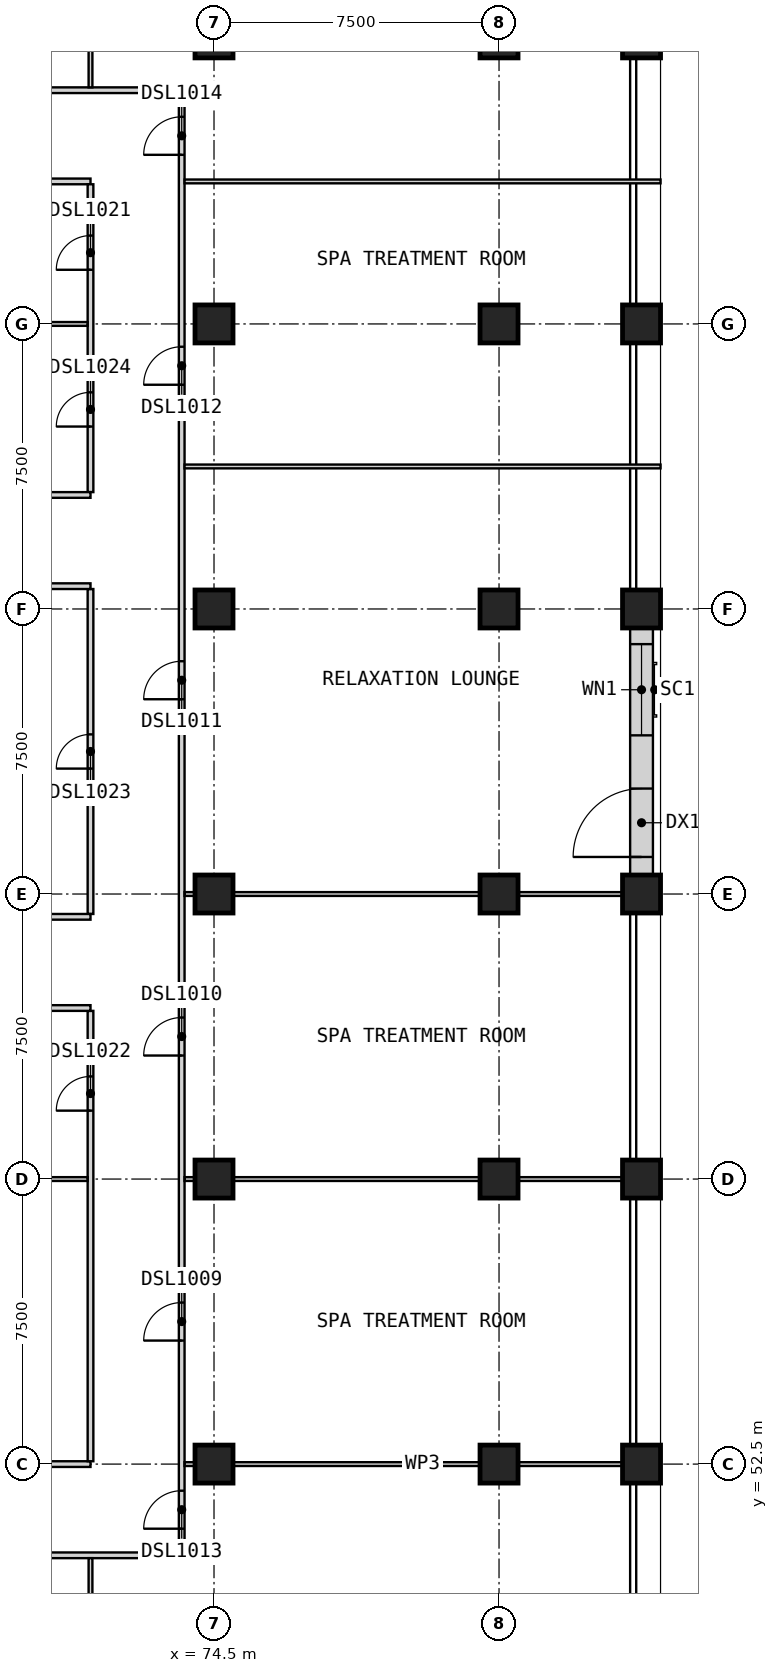
"""IFC4 building model, lengths in metres.
Left out: names, types, materials, properties, quantities, classifications, styles, units other than length and angle.
Written with IfcOpenShell. Run it as: python <this file> out.ifc"""

import sys

from ifc_helpers import new_model, si_unit, direction, frame, frame_2d, origin, origin_2d, place, context, subcontext, project, spatial, rectangle, extrude, element, fill, save


model = new_model("IFC4")
c1 = context("Model", 3, precision=1e-05, world=origin(), true_north=direction((0.0, 1.0)))
c2 = subcontext(c1, "Body", "Model", "MODEL_VIEW")
j1 = project(units=[si_unit("LENGTHUNIT", "METRE"), si_unit("PLANEANGLEUNIT", "RADIAN")], contexts=[c1])
p1 = place(None, origin())
s1 = spatial("IfcSite", under=j1, at=p1, CompositionType="ELEMENT")
p2 = place(p1, origin())
s2 = spatial("IfcBuilding", under=s1, at=p2, CompositionType="ELEMENT")
p3 = place(p2, frame((0.0, 0.0, 124.2)))
s3 = spatial("IfcBuildingStorey", under=s2, at=p3, CompositionType="ELEMENT", Elevation=124.2)
for number, where, z_axis, x_axis in (
    (1, (85.75, 52.5, 0.0), (0.0, 0.0, 1.0), (1.0, 0.0, 0.0)),
    (2, (85.75, 60.0, 0.0), (0.0, 0.0, 1.0), (1.0, 0.0, 0.0)),
    (3, (85.75, 67.5, 0.0), (0.0, 0.0, 1.0), (1.0, 0.0, 0.0)),
    (4, (85.75, 75.0, 0.0), (0.0, 0.0, 1.0), (1.0, 0.0, 0.0)),
    (5, (85.75, 82.5, 0.0), (0.0, 0.0, 1.0), (1.0, 0.0, 0.0)),
    (6, (85.75, 90.0, 0.0), (0.0, 0.0, 1.0), (1.0, 0.0, 0.0)),
    (7, (74.5, 52.5, 0.0), (0.0, 0.0, 1.0), (1.0, 0.0, 0.0)),
    (8, (74.5, 60.0, 0.0), (0.0, 0.0, 1.0), (1.0, 0.0, 0.0)),
    (9, (74.5, 67.5, 0.0), (0.0, 0.0, 1.0), (1.0, 0.0, 0.0)),
    (10, (74.5, 75.0, 0.0), (0.0, 0.0, 1.0), (1.0, 0.0, 0.0)),
    (11, (74.5, 82.5, 0.0), (0.0, 0.0, 1.0), (1.0, 0.0, 0.0)),
    (12, (74.5, 90.0, 0.0), (0.0, 0.0, 1.0), (1.0, 0.0, 0.0)),
    (13, (82.0, 52.5, 0.0), (0.0, 0.0, 1.0), (1.0, 0.0, 0.0)),
    (14, (82.0, 60.0, 0.0), (0.0, 0.0, 1.0), (1.0, 0.0, 0.0)),
    (15, (82.0, 67.5, 0.0), (0.0, 0.0, 1.0), (1.0, 0.0, 0.0)),
    (16, (82.0, 75.0, 0.0), (0.0, 0.0, 1.0), (1.0, 0.0, 0.0)),
    (17, (82.0, 82.5, 0.0), (0.0, 0.0, 1.0), (1.0, 0.0, 0.0)),
    (18, (82.0, 90.0, 0.0), (0.0, 0.0, 1.0), (1.0, 0.0, 0.0)),
):
    element("IfcColumn", number, at=place(p3, frame(where, z_axis=z_axis, x_axis=x_axis)), inside=s3, PredefinedType="COLUMN", context=c2, shape_type="SweptSolid", body=[
        extrude(rectangle(XDim=1.0, YDim=1.0, at=origin_2d()), origin(), (0.0, 0.0, 1.0), 6.0),
    ])
p4 = place(p3, frame((85.75, 68.0, 0.0), z_axis=(0.0, 0.0, 1.0), x_axis=(0.0, 1.0, 0.0)))
e19 = element("IfcWall", 19, at=p4, inside=s3, PredefinedType="SOLIDWALL", context=c2, shape_type="SweptSolid", body=[
    extrude(rectangle(XDim=6.5, YDim=0.6, at=frame_2d((3.25, 0.0))), origin(), (0.0, 0.0, 1.0), 5.25),
])
p5 = place(p4, frame((0.475, 0.0, 0.0)))
e20 = element("IfcOpeningElement", 20, at=p5, cuts=e19, PredefinedType="OPENING", context=c2, shape_type="SweptSolid", body=[
    extrude(rectangle(XDim=1.8, YDim=2.4, at=frame_2d((0.9, 1.2))), frame((0.0, 0.31, 0.0), z_axis=(0.0, -1.0, 0.0), x_axis=(1.0, 0.0, 0.0)), (0.0, 0.0, 1.0), 0.62),
])
p6 = place(p4, frame((3.675, 0.0, 0.8)))
e21 = element("IfcOpeningElement", 21, at=p6, cuts=e19, PredefinedType="OPENING", context=c2, shape_type="SweptSolid", body=[
    extrude(rectangle(XDim=2.4, YDim=1.8, at=frame_2d((1.2, 0.9))), frame((0.0, 0.31, 0.0), z_axis=(0.0, -1.0, 0.0), x_axis=(1.0, 0.0, 0.0)), (0.0, 0.0, 1.0), 0.62),
])
p7 = place(p3, frame((30.0, 50.1, 0.0), z_axis=(0.0, 0.0, 1.0), x_axis=(1.0, 0.0, 0.0)))
e22 = element("IfcWall", 22, at=p7, inside=s3, PredefinedType="PARTITIONING", context=c2, shape_type="SweptSolid", body=[
    extrude(rectangle(XDim=43.65, YDim=0.15, at=frame_2d((21.825, 0.0))), origin(), (0.0, 0.0, 1.0), 5.75),
])
p8 = place(p7, frame((5.125, 0.0, 0.0)))
e23 = element("IfcOpeningElement", 23, at=p8, cuts=e22, PredefinedType="OPENING", context=c2, shape_type="SweptSolid", body=[
    extrude(rectangle(XDim=1.0, YDim=2.1, at=frame_2d((0.5, 1.05))), frame((0.0, 0.085, 0.0), z_axis=(0.0, -1.0, 0.0), x_axis=(1.0, 0.0, 0.0)), (0.0, 0.0, 1.0), 0.17),
])
p9 = place(p7, frame((14.1, 0.0, 0.0)))
e24 = element("IfcOpeningElement", 24, at=p9, cuts=e22, PredefinedType="OPENING", context=c2, shape_type="SweptSolid", body=[
    extrude(rectangle(XDim=1.8, YDim=2.1, at=frame_2d((0.9, 1.05))), frame((0.0, 0.085, 0.0), z_axis=(0.0, -1.0, 0.0), x_axis=(1.0, 0.0, 0.0)), (0.0, 0.0, 1.0), 0.17),
])
p10 = place(p7, frame((27.225, 0.0, 0.0)))
e25 = element("IfcOpeningElement", 25, at=p10, cuts=e22, PredefinedType="OPENING", context=c2, shape_type="SweptSolid", body=[
    extrude(rectangle(XDim=1.8, YDim=2.1, at=frame_2d((0.9, 1.05))), frame((0.0, 0.085, 0.0), z_axis=(0.0, -1.0, 0.0), x_axis=(1.0, 0.0, 0.0)), (0.0, 0.0, 1.0), 0.17),
])
p11 = place(p7, frame((37.0, 0.0, 0.0)))
e26 = element("IfcOpeningElement", 26, at=p11, cuts=e22, PredefinedType="OPENING", context=c2, shape_type="SweptSolid", body=[
    extrude(rectangle(XDim=1.0, YDim=2.1, at=frame_2d((0.5, 1.05))), frame((0.0, 0.085, 0.0), z_axis=(0.0, -1.0, 0.0), x_axis=(1.0, 0.0, 0.0)), (0.0, 0.0, 1.0), 0.17),
])
p12 = place(p3, frame((60.0, 52.5, 0.0), z_axis=(0.0, 0.0, 1.0), x_axis=(1.0, 0.0, 0.0)))
e27 = element("IfcWall", 27, at=p12, inside=s3, PredefinedType="PARTITIONING", context=c2, shape_type="SweptSolid", body=[
    extrude(rectangle(XDim=11.25, YDim=0.15, at=frame_2d((5.625, 0.0))), origin(), (0.0, 0.0, 1.0), 5.75),
])
p13 = place(p12, frame((5.175, 0.0, 0.0)))
e28 = element("IfcOpeningElement", 28, at=p13, cuts=e27, PredefinedType="OPENING", context=c2, shape_type="SweptSolid", body=[
    extrude(rectangle(XDim=0.9, YDim=2.1, at=frame_2d((0.45, 1.05))), frame((0.0, 0.085, 0.0), z_axis=(0.0, -1.0, 0.0), x_axis=(1.0, 0.0, 0.0)), (0.0, 0.0, 1.0), 0.17),
])
p14 = place(p3, frame((33.75, 86.25, 0.0), z_axis=(0.0, 0.0, 1.0), x_axis=(1.0, 0.0, 0.0)))
e29 = element("IfcWall", 29, at=p14, inside=s3, PredefinedType="PARTITIONING", context=c2, shape_type="SweptSolid", body=[
    extrude(rectangle(XDim=37.5, YDim=0.15, at=frame_2d((18.75, 0.0))), origin(), (0.0, 0.0, 1.0), 5.75),
])
p15 = place(p14, frame((9.15, 0.0, 0.0)))
e30 = element("IfcOpeningElement", 30, at=p15, cuts=e29, PredefinedType="OPENING", context=c2, shape_type="SweptSolid", body=[
    extrude(rectangle(XDim=0.9, YDim=2.1, at=frame_2d((0.45, 1.05))), frame((0.0, 0.085, 0.0), z_axis=(0.0, -1.0, 0.0), x_axis=(1.0, 0.0, 0.0)), (0.0, 0.0, 1.0), 0.17),
])
p16 = place(p14, frame((24.0, 0.0, 0.0)))
e31 = element("IfcOpeningElement", 31, at=p16, cuts=e29, PredefinedType="OPENING", context=c2, shape_type="SweptSolid", body=[
    extrude(rectangle(XDim=0.9, YDim=2.1, at=frame_2d((0.45, 1.05))), frame((0.0, 0.085, 0.0), z_axis=(0.0, -1.0, 0.0), x_axis=(1.0, 0.0, 0.0)), (0.0, 0.0, 1.0), 0.17),
])
p17 = place(p3, frame((33.75, 88.65, 0.0), z_axis=(0.0, 0.0, 1.0), x_axis=(1.0, 0.0, 0.0)))
e32 = element("IfcWall", 32, at=p17, inside=s3, PredefinedType="PARTITIONING", context=c2, shape_type="SweptSolid", body=[
    extrude(rectangle(XDim=39.9, YDim=0.15, at=frame_2d((19.95, 0.0))), origin(), (0.0, 0.0, 1.0), 5.75),
])
p18 = place(p17, frame((4.725, 0.0, 0.0)))
e33 = element("IfcOpeningElement", 33, at=p18, cuts=e32, PredefinedType="OPENING", context=c2, shape_type="SweptSolid", body=[
    extrude(rectangle(XDim=1.8, YDim=2.1, at=frame_2d((0.9, 1.05))), frame((0.0, 0.085, 0.0), z_axis=(0.0, -1.0, 0.0), x_axis=(1.0, 0.0, 0.0)), (0.0, 0.0, 1.0), 0.17),
])
p19 = place(p17, frame((14.5, 0.0, 0.0)))
e34 = element("IfcOpeningElement", 34, at=p19, cuts=e32, PredefinedType="OPENING", context=c2, shape_type="SweptSolid", body=[
    extrude(rectangle(XDim=1.0, YDim=2.1, at=frame_2d((0.5, 1.05))), frame((0.0, 0.085, 0.0), z_axis=(0.0, -1.0, 0.0), x_axis=(1.0, 0.0, 0.0)), (0.0, 0.0, 1.0), 0.17),
])
p20 = place(p17, frame((22.0, 0.0, 0.0)))
e35 = element("IfcOpeningElement", 35, at=p20, cuts=e32, PredefinedType="OPENING", context=c2, shape_type="SweptSolid", body=[
    extrude(rectangle(XDim=1.0, YDim=2.1, at=frame_2d((0.5, 1.05))), frame((0.0, 0.085, 0.0), z_axis=(0.0, -1.0, 0.0), x_axis=(1.0, 0.0, 0.0)), (0.0, 0.0, 1.0), 0.17),
])
p21 = place(p17, frame((31.375, 0.0, 0.0)))
e36 = element("IfcOpeningElement", 36, at=p21, cuts=e32, PredefinedType="OPENING", context=c2, shape_type="SweptSolid", body=[
    extrude(rectangle(XDim=1.0, YDim=2.1, at=frame_2d((0.5, 1.05))), frame((0.0, 0.085, 0.0), z_axis=(0.0, -1.0, 0.0), x_axis=(1.0, 0.0, 0.0)), (0.0, 0.0, 1.0), 0.17),
])
p22 = place(p3, frame((71.25, 52.575, 0.0), z_axis=(0.0, 0.0, 1.0), x_axis=(0.0, 1.0, 0.0)))
e37 = element("IfcWall", 37, at=p22, inside=s3, PredefinedType="PARTITIONING", context=c2, shape_type="SweptSolid", body=[
    extrude(rectangle(XDim=11.85, YDim=0.15, at=frame_2d((5.925, 0.0))), origin(), (0.0, 0.0, 1.0), 5.75),
])
p23 = place(p22, frame((9.225, 0.0, 0.0)))
e38 = element("IfcOpeningElement", 38, at=p23, cuts=e37, PredefinedType="OPENING", context=c2, shape_type="SweptSolid", body=[
    extrude(rectangle(XDim=0.9, YDim=2.1, at=frame_2d((0.45, 1.05))), frame((0.0, 0.085, 0.0), z_axis=(0.0, -1.0, 0.0), x_axis=(1.0, 0.0, 0.0)), (0.0, 0.0, 1.0), 0.17),
])
p24 = place(p3, frame((71.25, 66.975, 0.0), z_axis=(0.0, 0.0, 1.0), x_axis=(0.0, 1.0, 0.0)))
e39 = element("IfcWall", 39, at=p24, inside=s3, PredefinedType="PARTITIONING", context=c2, shape_type="SweptSolid", body=[
    extrude(rectangle(XDim=8.55, YDim=0.15, at=frame_2d((4.275, 0.0))), origin(), (0.0, 0.0, 1.0), 5.75),
])
p25 = place(p24, frame((3.825, 0.0, 0.0)))
e40 = element("IfcOpeningElement", 40, at=p25, cuts=e39, PredefinedType="OPENING", context=c2, shape_type="SweptSolid", body=[
    extrude(rectangle(XDim=0.9, YDim=2.1, at=frame_2d((0.45, 1.05))), frame((0.0, 0.085, 0.0), z_axis=(0.0, -1.0, 0.0), x_axis=(1.0, 0.0, 0.0)), (0.0, 0.0, 1.0), 0.17),
])
p26 = place(p3, frame((71.25, 78.075, 0.0), z_axis=(0.0, 0.0, 1.0), x_axis=(0.0, 1.0, 0.0)))
e41 = element("IfcWall", 41, at=p26, inside=s3, PredefinedType="PARTITIONING", context=c2, shape_type="SweptSolid", body=[
    extrude(rectangle(XDim=8.1, YDim=0.15, at=frame_2d((4.05, 0.0))), origin(), (0.0, 0.0, 1.0), 5.75),
])
p27 = place(p26, frame((5.85, 0.0, 0.0)))
e42 = element("IfcOpeningElement", 42, at=p27, cuts=e41, PredefinedType="OPENING", context=c2, shape_type="SweptSolid", body=[
    extrude(rectangle(XDim=0.9, YDim=2.1, at=frame_2d((0.45, 1.05))), frame((0.0, 0.085, 0.0), z_axis=(0.0, -1.0, 0.0), x_axis=(1.0, 0.0, 0.0)), (0.0, 0.0, 1.0), 0.17),
])
p28 = place(p26, frame((1.725, 0.0, 0.0)))
e43 = element("IfcOpeningElement", 43, at=p28, cuts=e41, PredefinedType="OPENING", context=c2, shape_type="SweptSolid", body=[
    extrude(rectangle(XDim=0.9, YDim=2.1, at=frame_2d((0.45, 1.05))), frame((0.0, 0.085, 0.0), z_axis=(0.0, -1.0, 0.0), x_axis=(1.0, 0.0, 0.0)), (0.0, 0.0, 1.0), 0.17),
])
p29 = place(p3, frame((73.65, 50.175, 0.0), z_axis=(0.0, 0.0, 1.0), x_axis=(0.0, 1.0, 0.0)))
e44 = element("IfcWall", 44, at=p29, inside=s3, PredefinedType="PARTITIONING", context=c2, shape_type="SweptSolid", body=[
    extrude(rectangle(XDim=38.4, YDim=0.15, at=frame_2d((19.2, 0.0))), origin(), (0.0, 0.0, 1.0), 5.75),
])
p30 = place(p29, frame((5.575, 0.0, 0.0)))
e45 = element("IfcOpeningElement", 45, at=p30, cuts=e44, PredefinedType="OPENING", context=c2, shape_type="SweptSolid", body=[
    extrude(rectangle(XDim=1.0, YDim=2.1, at=frame_2d((0.5, 1.05))), frame((0.0, 0.085, 0.0), z_axis=(0.0, -1.0, 0.0), x_axis=(1.0, 0.0, 0.0)), (0.0, 0.0, 1.0), 0.17),
])
p31 = place(p29, frame((13.075, 0.0, 0.0)))
e46 = element("IfcOpeningElement", 46, at=p31, cuts=e44, PredefinedType="OPENING", context=c2, shape_type="SweptSolid", body=[
    extrude(rectangle(XDim=1.0, YDim=2.1, at=frame_2d((0.5, 1.05))), frame((0.0, 0.085, 0.0), z_axis=(0.0, -1.0, 0.0), x_axis=(1.0, 0.0, 0.0)), (0.0, 0.0, 1.0), 0.17),
])
p32 = place(p29, frame((22.45, 0.0, 0.0)))
e47 = element("IfcOpeningElement", 47, at=p32, cuts=e44, PredefinedType="OPENING", context=c2, shape_type="SweptSolid", body=[
    extrude(rectangle(XDim=1.0, YDim=2.1, at=frame_2d((0.5, 1.05))), frame((0.0, 0.085, 0.0), z_axis=(0.0, -1.0, 0.0), x_axis=(1.0, 0.0, 0.0)), (0.0, 0.0, 1.0), 0.17),
])
p33 = place(p29, frame((30.725, 0.0, 0.0)))
e48 = element("IfcOpeningElement", 48, at=p33, cuts=e44, PredefinedType="OPENING", context=c2, shape_type="SweptSolid", body=[
    extrude(rectangle(XDim=1.0, YDim=2.1, at=frame_2d((0.5, 1.05))), frame((0.0, 0.085, 0.0), z_axis=(0.0, -1.0, 0.0), x_axis=(1.0, 0.0, 0.0)), (0.0, 0.0, 1.0), 0.17),
])
p34 = place(p29, frame((0.625, 0.0, 0.0)))
e49 = element("IfcOpeningElement", 49, at=p34, cuts=e44, PredefinedType="OPENING", context=c2, shape_type="SweptSolid", body=[
    extrude(rectangle(XDim=1.0, YDim=2.1, at=frame_2d((0.5, 1.05))), frame((0.0, 0.085, 0.0), z_axis=(0.0, -1.0, 0.0), x_axis=(1.0, 0.0, 0.0)), (0.0, 0.0, 1.0), 0.17),
])
p35 = place(p29, frame((36.775, 0.0, 0.0)))
e50 = element("IfcOpeningElement", 50, at=p35, cuts=e44, PredefinedType="OPENING", context=c2, shape_type="SweptSolid", body=[
    extrude(rectangle(XDim=1.0, YDim=2.1, at=frame_2d((0.5, 1.05))), frame((0.0, 0.085, 0.0), z_axis=(0.0, -1.0, 0.0), x_axis=(1.0, 0.0, 0.0)), (0.0, 0.0, 1.0), 0.17),
])
p36 = place(p3, frame((73.725, 52.5, 0.0), z_axis=(0.0, 0.0, 1.0), x_axis=(1.0, 0.0, 0.0)))
e51 = element("IfcWall", 51, at=p36, inside=s3, PredefinedType="PARTITIONING", context=c2, shape_type="SweptSolid", body=[
    extrude(rectangle(XDim=12.525, YDim=0.1, at=frame_2d((6.262, 0.0))), origin(), (0.0, 0.0, 1.0), 5.75),
])
p37 = place(p3, frame((60.075, 60.0, 0.0), z_axis=(0.0, 0.0, 1.0), x_axis=(1.0, 0.0, 0.0)))
e52 = element("IfcWall", 52, at=p37, inside=s3, PredefinedType="PARTITIONING", context=c2, shape_type="SweptSolid", body=[
    extrude(rectangle(XDim=11.1, YDim=0.1, at=frame_2d((5.55, 0.0))), origin(), (0.0, 0.0, 1.0), 5.75),
])
for number, where, z_axis, x_axis in (
    (53, (73.725, 60.0, 0.0), (0.0, 0.0, 1.0), (1.0, 0.0, 0.0)),
    (54, (73.725, 67.5, 0.0), (0.0, 0.0, 1.0), (1.0, 0.0, 0.0)),
    (55, (73.725, 78.75, 0.0), (0.0, 0.0, 1.0), (1.0, 0.0, 0.0)),
):
    element("IfcWall", number, at=place(p3, frame(where, z_axis=z_axis, x_axis=x_axis)), inside=s3, PredefinedType="PARTITIONING", context=c2, shape_type="SweptSolid", body=[
        extrude(rectangle(XDim=12.525, YDim=0.1, at=frame_2d((6.262, 0.0))), origin(), (0.0, 0.0, 1.0), 5.75),
    ])
p38 = place(p3, frame((60.0, 82.5, 0.0), z_axis=(0.0, 0.0, 1.0), x_axis=(1.0, 0.0, 0.0)))
e56 = element("IfcWall", 56, at=p38, inside=s3, PredefinedType="PARTITIONING", context=c2, shape_type="SweptSolid", body=[
    extrude(rectangle(XDim=11.175, YDim=0.1, at=frame_2d((5.587, 0.0))), origin(), (0.0, 0.0, 1.0), 5.75),
])
for number, where, z_axis, x_axis in (
    (57, (73.725, 86.25, 0.0), (0.0, 0.0, 1.0), (1.0, 0.0, 0.0)),
    (58, (71.25, 37.5, 0.0), (0.0, 0.0, 1.0), (0.0, 1.0, 0.0)),
    (59, (71.25, 88.725, 0.0), (0.0, 0.0, 1.0), (0.0, 1.0, 0.0)),
):
    element("IfcWall", number, at=place(p3, frame(where, z_axis=z_axis, x_axis=x_axis)), inside=s3, PredefinedType="PARTITIONING", context=c2, shape_type="SweptSolid", body=[
        extrude(rectangle(XDim=12.525, YDim=0.1, at=frame_2d((6.262, 0.0))), origin(), (0.0, 0.0, 1.0), 5.75),
    ])
for number, where, z_axis, x_axis in (
    (60, (60.0, 64.5, 0.0), (0.0, 0.0, 1.0), (1.0, 0.0, 0.0)),
    (61, (60.0, 66.9, 0.0), (0.0, 0.0, 1.0), (1.0, 0.0, 0.0)),
    (62, (60.0, 75.6, 0.0), (0.0, 0.0, 1.0), (1.0, 0.0, 0.0)),
    (63, (60.0, 78.0, 0.0), (0.0, 0.0, 1.0), (1.0, 0.0, 0.0)),
):
    element("IfcWall", number, at=place(p3, frame(where, z_axis=z_axis, x_axis=x_axis)), inside=s3, PredefinedType="PARTITIONING", context=c2, shape_type="SweptSolid", body=[
        extrude(rectangle(XDim=11.25, YDim=0.15, at=frame_2d((5.625, 0.0))), origin(), (0.0, 0.0, 1.0), 5.75),
    ])
p39 = place(p5, origin())
e64 = element("IfcDoor", 64, at=p39, inside=s3, OperationType="SINGLE_SWING_LEFT", PredefinedType="DOOR", context=c2, shape_type="SweptSolid", body=[
    extrude(rectangle(XDim=1.8, YDim=2.4, at=frame_2d((0.9, 1.2))), frame((0.0, -0.075, 0.0), z_axis=(0.0, -1.0, 0.0), x_axis=(1.0, 0.0, 0.0)), (0.0, 0.0, 1.0), 0.05),
])
fill(e20, e64)
p40 = place(p6, origin())
e65 = element("IfcWindow", 65, at=p40, inside=s3, PartitioningType="SINGLE_PANEL", PredefinedType="WINDOW", context=c2, shape_type="SweptSolid", body=[
    extrude(rectangle(XDim=2.4, YDim=1.8, at=frame_2d((1.2, 0.9))), frame((0.0, -0.07, 0.0), z_axis=(0.0, -1.0, 0.0), x_axis=(1.0, 0.0, 0.0)), (0.0, 0.0, 1.0), 0.06),
])
fill(e21, e65)
p41 = place(p30, origin())
e66 = element("IfcDoor", 66, at=p41, inside=s3, OperationType="SINGLE_SWING_RIGHT", PredefinedType="DOOR", context=c2, shape_type="SweptSolid", body=[
    extrude(rectangle(XDim=1.0, YDim=2.1, at=frame_2d((0.5, 1.05))), frame((0.0, 0.025, 0.0), z_axis=(0.0, -1.0, 0.0), x_axis=(1.0, 0.0, 0.0)), (0.0, 0.0, 1.0), 0.05),
])
fill(e45, e66)
p42 = place(p31, origin())
e67 = element("IfcDoor", 67, at=p42, inside=s3, OperationType="SINGLE_SWING_RIGHT", PredefinedType="DOOR", context=c2, shape_type="SweptSolid", body=[
    extrude(rectangle(XDim=1.0, YDim=2.1, at=frame_2d((0.5, 1.05))), frame((0.0, 0.025, 0.0), z_axis=(0.0, -1.0, 0.0), x_axis=(1.0, 0.0, 0.0)), (0.0, 0.0, 1.0), 0.05),
])
fill(e46, e67)
p43 = place(p32, origin())
e68 = element("IfcDoor", 68, at=p43, inside=s3, OperationType="SINGLE_SWING_RIGHT", PredefinedType="DOOR", context=c2, shape_type="SweptSolid", body=[
    extrude(rectangle(XDim=1.0, YDim=2.1, at=frame_2d((0.5, 1.05))), frame((0.0, 0.025, 0.0), z_axis=(0.0, -1.0, 0.0), x_axis=(1.0, 0.0, 0.0)), (0.0, 0.0, 1.0), 0.05),
])
fill(e47, e68)
p44 = place(p33, origin())
e69 = element("IfcDoor", 69, at=p44, inside=s3, OperationType="SINGLE_SWING_RIGHT", PredefinedType="DOOR", context=c2, shape_type="SweptSolid", body=[
    extrude(rectangle(XDim=1.0, YDim=2.1, at=frame_2d((0.5, 1.05))), frame((0.0, 0.025, 0.0), z_axis=(0.0, -1.0, 0.0), x_axis=(1.0, 0.0, 0.0)), (0.0, 0.0, 1.0), 0.05),
])
fill(e48, e69)
p45 = place(p34, origin())
e70 = element("IfcDoor", 70, at=p45, inside=s3, OperationType="SINGLE_SWING_LEFT", PredefinedType="DOOR", context=c2, shape_type="SweptSolid", body=[
    extrude(rectangle(XDim=1.0, YDim=2.1, at=frame_2d((0.5, 1.05))), frame((0.0, 0.025, 0.0), z_axis=(0.0, -1.0, 0.0), x_axis=(1.0, 0.0, 0.0)), (0.0, 0.0, 1.0), 0.05),
])
fill(e49, e70)
p46 = place(p35, origin())
e71 = element("IfcDoor", 71, at=p46, inside=s3, OperationType="SINGLE_SWING_LEFT", PredefinedType="DOOR", context=c2, shape_type="SweptSolid", body=[
    extrude(rectangle(XDim=1.0, YDim=2.1, at=frame_2d((0.5, 1.05))), frame((0.0, 0.025, 0.0), z_axis=(0.0, -1.0, 0.0), x_axis=(1.0, 0.0, 0.0)), (0.0, 0.0, 1.0), 0.05),
])
fill(e50, e71)
p47 = place(p27, origin())
e72 = element("IfcDoor", 72, at=p47, inside=s3, OperationType="SINGLE_SWING_LEFT", PredefinedType="DOOR", context=c2, shape_type="SweptSolid", body=[
    extrude(rectangle(XDim=0.9, YDim=2.1, at=frame_2d((0.45, 1.05))), frame((0.0, 0.025, 0.0), z_axis=(0.0, -1.0, 0.0), x_axis=(1.0, 0.0, 0.0)), (0.0, 0.0, 1.0), 0.05),
])
fill(e42, e72)
p48 = place(p23, origin())
e73 = element("IfcDoor", 73, at=p48, inside=s3, OperationType="SINGLE_SWING_LEFT", PredefinedType="DOOR", context=c2, shape_type="SweptSolid", body=[
    extrude(rectangle(XDim=0.9, YDim=2.1, at=frame_2d((0.45, 1.05))), frame((0.0, 0.025, 0.0), z_axis=(0.0, -1.0, 0.0), x_axis=(1.0, 0.0, 0.0)), (0.0, 0.0, 1.0), 0.05),
])
fill(e38, e73)
p49 = place(p25, origin())
e74 = element("IfcDoor", 74, at=p49, inside=s3, OperationType="SINGLE_SWING_LEFT", PredefinedType="DOOR", context=c2, shape_type="SweptSolid", body=[
    extrude(rectangle(XDim=0.9, YDim=2.1, at=frame_2d((0.45, 1.05))), frame((0.0, 0.025, 0.0), z_axis=(0.0, -1.0, 0.0), x_axis=(1.0, 0.0, 0.0)), (0.0, 0.0, 1.0), 0.05),
])
fill(e40, e74)
p50 = place(p28, origin())
e75 = element("IfcDoor", 75, at=p50, inside=s3, OperationType="SINGLE_SWING_LEFT", PredefinedType="DOOR", context=c2, shape_type="SweptSolid", body=[
    extrude(rectangle(XDim=0.9, YDim=2.1, at=frame_2d((0.45, 1.05))), frame((0.0, 0.025, 0.0), z_axis=(0.0, -1.0, 0.0), x_axis=(1.0, 0.0, 0.0)), (0.0, 0.0, 1.0), 0.05),
])
fill(e43, e75)
save(model, sys.argv[1])
